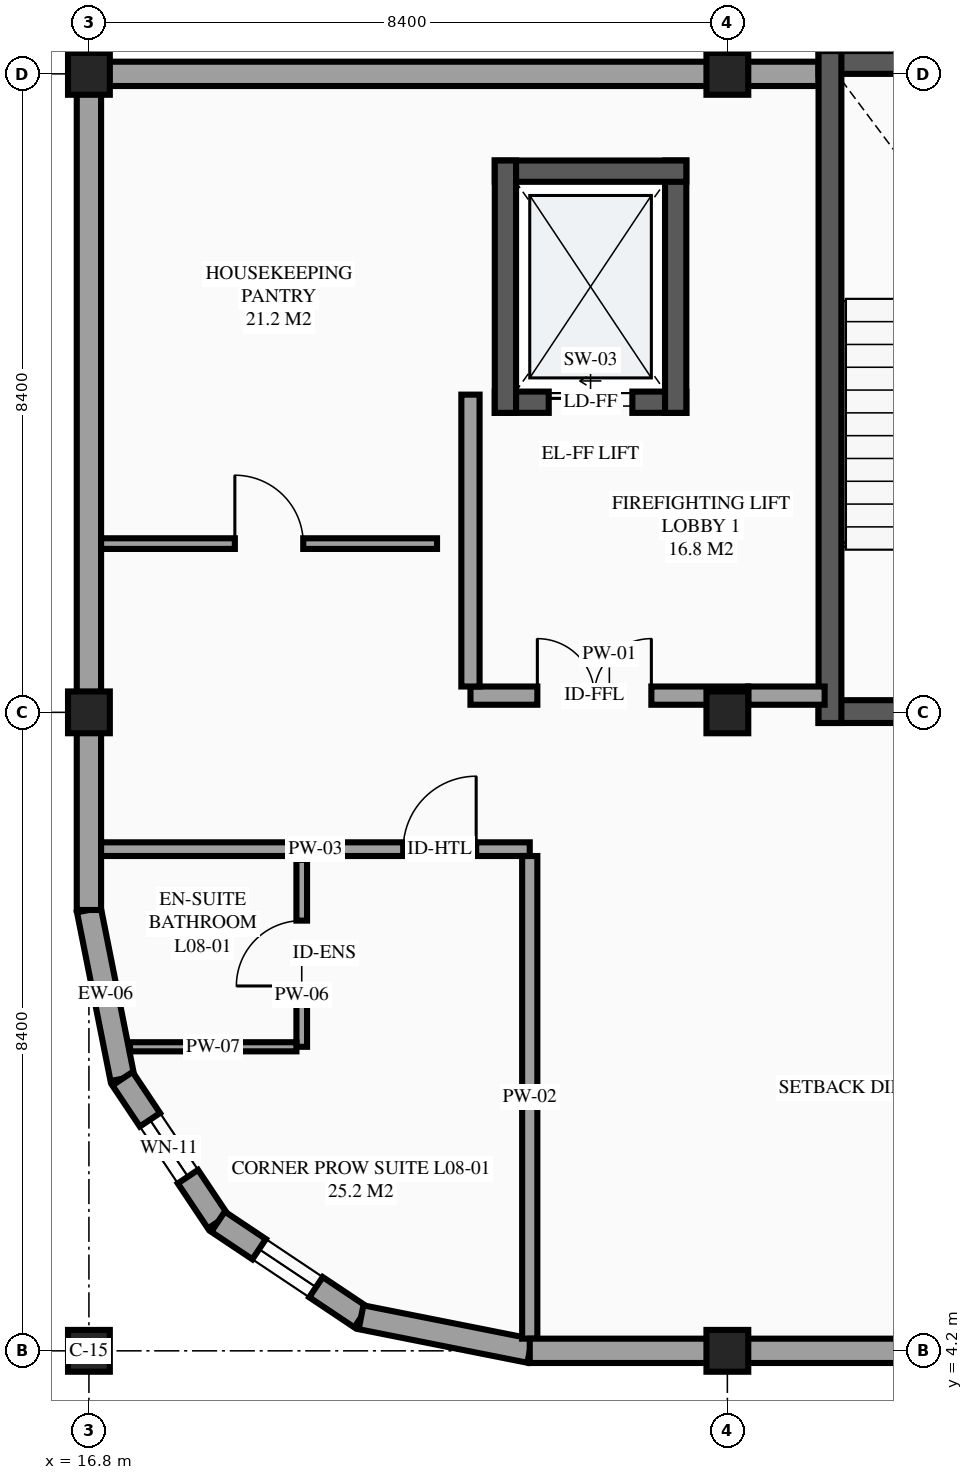
"""IFC4 building model, lengths in metres.
Left out: names, types, materials, properties, quantities, classifications, styles, units other than length and angle.
Written with IfcOpenShell. Run it as: python <this file> out.ifc"""

import sys

from ifc_helpers import new_model, si_unit, direction, frame, frame_2d, origin, origin_2d, place, context, subcontext, project, spatial, rectangle, extrude, element, fill, save


model = new_model("IFC4")
c1 = context("Model", 3, precision=1e-05, world=origin(), true_north=direction((0.0, 1.0)))
c2 = subcontext(c1, "Body", "Model", "MODEL_VIEW")
j1 = project(units=[si_unit("LENGTHUNIT", "METRE"), si_unit("PLANEANGLEUNIT", "RADIAN")], contexts=[c1])
p1 = place(None, origin())
s1 = spatial("IfcSite", under=j1, at=p1, CompositionType="ELEMENT")
p2 = place(p1, origin())
s2 = spatial("IfcBuilding", under=s1, at=p2, CompositionType="ELEMENT")
p3 = place(p2, frame((0.0, 0.0, 32.7)))
s3 = spatial("IfcBuildingStorey", under=s2, at=p3, CompositionType="ELEMENT", Elevation=32.7)
for number, where, z_axis, x_axis in (
    (1, (16.8, 4.2, 0.0), (0.0, 0.0, 1.0), (1.0, 0.0, 0.0)),
    (2, (16.8, 12.6, 0.0), (0.0, 0.0, 1.0), (1.0, 0.0, 0.0)),
    (3, (16.8, 21.0, 0.0), (0.0, 0.0, 1.0), (1.0, 0.0, 0.0)),
    (4, (25.2, 4.2, 0.0), (0.0, 0.0, 1.0), (1.0, 0.0, 0.0)),
    (5, (25.2, 12.6, 0.0), (0.0, 0.0, 1.0), (1.0, 0.0, 0.0)),
    (6, (25.2, 21.0, 0.0), (0.0, 0.0, 1.0), (1.0, 0.0, 0.0)),
):
    element("IfcColumn", number, at=place(p3, frame(where, z_axis=z_axis, x_axis=x_axis)), inside=s3, PredefinedType="COLUMN", context=c2, shape_type="SweptSolid", body=[
        extrude(rectangle(XDim=0.55, YDim=0.55, at=origin_2d()), origin(), (0.0, 0.0, 1.0), 3.6),
    ])
p4 = place(p3, frame((16.8, 10.0, 0.0), z_axis=(0.0, 0.0, 1.0), x_axis=(0.195057908159, -0.980791727363, 0.0)))
e7 = element("IfcWall", 7, at=p4, inside=s3, PredefinedType="STANDARD", context=c2, shape_type="SweptSolid", body=[
    extrude(rectangle(XDim=2.263, YDim=0.32, at=frame_2d((1.131, 0.0))), origin(), (0.0, 0.0, 1.0), 2.78),
])
p5 = place(p3, frame((17.241, 7.781, 0.0), z_axis=(0.0, 0.0, 1.0), x_axis=(0.555546297918, -0.831485604728, 0.0)))
e8 = element("IfcWall", 8, at=p5, inside=s3, PredefinedType="STANDARD", context=c2, shape_type="SweptSolid", body=[
    extrude(rectangle(XDim=2.263, YDim=0.32, at=frame_2d((1.132, 0.0))), origin(), (0.0, 0.0, 1.0), 3.6),
])
p6 = place(p5, frame((0.65, 0.0, 0.75)))
e9 = element("IfcOpeningElement", 9, at=p6, cuts=e8, PredefinedType="OPENING", context=c2, shape_type="SweptSolid", body=[
    extrude(rectangle(XDim=0.9, YDim=1.55, at=frame_2d((0.45, 0.775))), frame((0.0, 0.17, 0.0), z_axis=(0.0, -1.0, 0.0), x_axis=(1.0, 0.0, 0.0)), (0.0, 0.0, 1.0), 0.34),
])
p7 = place(p3, frame((18.499, 5.899, 0.0), z_axis=(0.0, 0.0, 1.0), x_axis=(0.831502143458, -0.555521543618, 0.0)))
e10 = element("IfcWall", 10, at=p7, inside=s3, PredefinedType="STANDARD", context=c2, shape_type="SweptSolid", body=[
    extrude(rectangle(XDim=2.263, YDim=0.32, at=frame_2d((1.131, 0.0))), origin(), (0.0, 0.0, 1.0), 3.6),
])
p8 = place(p7, frame((0.65, 0.0, 0.75)))
e11 = element("IfcOpeningElement", 11, at=p8, cuts=e10, PredefinedType="OPENING", context=c2, shape_type="SweptSolid", body=[
    extrude(rectangle(XDim=0.9, YDim=1.55, at=frame_2d((0.45, 0.775))), frame((0.0, 0.17, 0.0), z_axis=(0.0, -1.0, 0.0), x_axis=(1.0, 0.0, 0.0)), (0.0, 0.0, 1.0), 0.34),
])
p9 = place(p3, frame((20.38, 4.642, 0.0), z_axis=(0.0, 0.0, 1.0), x_axis=(0.98077519094, -0.195141038321, 0.0)))
e12 = element("IfcWall", 12, at=p9, inside=s3, PredefinedType="STANDARD", context=c2, shape_type="SweptSolid", body=[
    extrude(rectangle(XDim=2.263, YDim=0.32, at=frame_2d((1.132, 0.0))), origin(), (0.0, 0.0, 1.0), 2.88),
])
p10 = place(p3, frame((26.4, 21.0, 0.0), z_axis=(0.0, 0.0, 1.0), x_axis=(-1.0, 0.0, 0.0)))
e13 = element("IfcWall", 13, at=p10, inside=s3, PredefinedType="STANDARD", context=c2, shape_type="SweptSolid", body=[
    extrude(rectangle(XDim=9.6, YDim=0.32, at=frame_2d((4.8, 0.0))), origin(), (0.0, 0.0, 1.0), 2.53),
])
p11 = place(p3, frame((16.8, 21.0, 0.0), z_axis=(0.0, 0.0, 1.0), x_axis=(0.0, -1.0, 0.0)))
e14 = element("IfcWall", 14, at=p11, inside=s3, PredefinedType="STANDARD", context=c2, shape_type="SweptSolid", body=[
    extrude(rectangle(XDim=11.0, YDim=0.32, at=frame_2d((5.5, 0.0))), origin(), (0.0, 0.0, 1.0), 2.78),
])
p12 = place(p3, frame((22.14, 16.68, 0.0), z_axis=(0.0, 0.0, 1.0), x_axis=(1.0, 0.0, 0.0)))
e15 = element("IfcWall", 15, at=p12, inside=s3, PredefinedType="SHEAR", context=c2, shape_type="SweptSolid", body=[
    extrude(rectangle(XDim=2.52, YDim=0.28, at=frame_2d((1.26, 0.0))), origin(), (0.0, 0.0, 1.0), 3.6),
])
p13 = place(p12, frame((0.71, 0.0, 0.0)))
e16 = element("IfcOpeningElement", 16, at=p13, cuts=e15, PredefinedType="OPENING", context=c2, shape_type="SweptSolid", body=[
    extrude(rectangle(XDim=1.1, YDim=2.2, at=frame_2d((0.55, 1.1))), frame((0.0, 0.15, 0.0), z_axis=(0.0, -1.0, 0.0), x_axis=(1.0, 0.0, 0.0)), (0.0, 0.0, 1.0), 0.3),
])
p14 = place(p3, frame((24.52, 16.54, 0.0), z_axis=(0.0, 0.0, 1.0), x_axis=(0.0, 1.0, 0.0)))
e17 = element("IfcWall", 17, at=p14, inside=s3, PredefinedType="SHEAR", context=c2, shape_type="SweptSolid", body=[
    extrude(rectangle(XDim=3.32, YDim=0.28, at=frame_2d((1.66, 0.0))), origin(), (0.0, 0.0, 1.0), 3.6),
])
p15 = place(p3, frame((24.66, 19.72, 0.0), z_axis=(0.0, 0.0, 1.0), x_axis=(-1.0, 0.0, 0.0)))
e18 = element("IfcWall", 18, at=p15, inside=s3, PredefinedType="SHEAR", context=c2, shape_type="SweptSolid", body=[
    extrude(rectangle(XDim=2.52, YDim=0.28, at=frame_2d((1.26, 0.0))), origin(), (0.0, 0.0, 1.0), 3.6),
])
p16 = place(p3, frame((22.28, 19.86, 0.0), z_axis=(0.0, 0.0, 1.0), x_axis=(0.0, -1.0, 0.0)))
e19 = element("IfcWall", 19, at=p16, inside=s3, PredefinedType="SHEAR", context=c2, shape_type="SweptSolid", body=[
    extrude(rectangle(XDim=3.32, YDim=0.28, at=frame_2d((1.66, 0.0))), origin(), (0.0, 0.0, 1.0), 3.6),
])
p17 = place(p3, frame((26.4, 12.61, 0.0), z_axis=(0.0, 0.0, 1.0), x_axis=(1.0, 0.0, 0.0)))
e20 = element("IfcWall", 20, at=p17, inside=s3, PredefinedType="SHEAR", context=c2, shape_type="SweptSolid", body=[
    extrude(rectangle(XDim=5.2, YDim=0.3, at=frame_2d((2.6, 0.0))), origin(), (0.0, 0.0, 1.0), 3.6),
])
p18 = place(p17, frame((2.025, 0.0, 0.0)))
e21 = element("IfcOpeningElement", 21, at=p18, cuts=e20, PredefinedType="OPENING", context=c2, shape_type="SweptSolid", body=[
    extrude(rectangle(XDim=1.15, YDim=2.15, at=frame_2d((0.575, 1.075))), frame((0.0, 0.16, 0.0), z_axis=(0.0, -1.0, 0.0), x_axis=(1.0, 0.0, 0.0)), (0.0, 0.0, 1.0), 0.32),
])
p19 = place(p3, frame((31.6, 21.15, 0.0), z_axis=(0.0, 0.0, 1.0), x_axis=(-1.0, 0.0, 0.0)))
e22 = element("IfcWall", 22, at=p19, inside=s3, PredefinedType="SHEAR", context=c2, shape_type="SweptSolid", body=[
    extrude(rectangle(XDim=5.2, YDim=0.3, at=frame_2d((2.6, 0.0))), origin(), (0.0, 0.0, 1.0), 3.6),
])
p20 = place(p3, frame((26.55, 21.3, 0.0), z_axis=(0.0, 0.0, 1.0), x_axis=(0.0, -1.0, 0.0)))
e23 = element("IfcWall", 23, at=p20, inside=s3, PredefinedType="SHEAR", context=c2, shape_type="SweptSolid", body=[
    extrude(rectangle(XDim=8.84, YDim=0.3, at=frame_2d((4.42, 0.0))), origin(), (0.0, 0.0, 1.0), 3.6),
])
p21 = place(p3, frame((16.96, 10.8, 0.0), z_axis=(0.0, 0.0, 1.0), x_axis=(1.0, 0.0, 0.0)))
e24 = element("IfcWall", 24, at=p21, inside=s3, PredefinedType="PARTITIONING", context=c2, shape_type="SweptSolid", body=[
    extrude(rectangle(XDim=5.64, YDim=0.18, at=frame_2d((2.82, 0.0))), origin(), (0.0, 0.0, 1.0), 3.375),
])
p22 = place(p21, frame((3.975, 0.0, 0.0)))
e25 = element("IfcOpeningElement", 25, at=p22, cuts=e24, PredefinedType="OPENING", context=c2, shape_type="SweptSolid", body=[
    extrude(rectangle(XDim=0.96, YDim=2.15, at=frame_2d((0.48, 1.075))), frame((0.0, 0.1, 0.0), z_axis=(0.0, -1.0, 0.0), x_axis=(1.0, 0.0, 0.0)), (0.0, 0.0, 1.0), 0.2),
])
p23 = place(p3, frame((22.6, 4.36, 0.0), z_axis=(0.0, 0.0, 1.0), x_axis=(0.0, 1.0, 0.0)))
e26 = element("IfcWall", 26, at=p23, inside=s3, PredefinedType="PARTITIONING", context=c2, shape_type="SweptSolid", body=[
    extrude(rectangle(XDim=6.35, YDim=0.2, at=frame_2d((3.175, 0.0))), origin(), (0.0, 0.0, 1.0), 3.375),
])
p24 = place(p3, frame((19.6, 8.2, 0.0), z_axis=(0.0, 0.0, 1.0), x_axis=(0.0, 1.0, 0.0)))
e27 = element("IfcWall", 27, at=p24, inside=s3, PredefinedType="PARTITIONING", context=c2, shape_type="SweptSolid", body=[
    extrude(rectangle(XDim=2.46, YDim=0.14, at=frame_2d((1.23, 0.0))), origin(), (0.0, 0.0, 1.0), 3.375),
])
p25 = place(p24, frame((0.8, 0.0, 0.0)))
e28 = element("IfcOpeningElement", 28, at=p25, cuts=e27, PredefinedType="OPENING", context=c2, shape_type="SweptSolid", body=[
    extrude(rectangle(XDim=0.86, YDim=2.1, at=frame_2d((0.43, 1.05))), frame((0.0, 0.08, 0.0), z_axis=(0.0, -1.0, 0.0), x_axis=(1.0, 0.0, 0.0)), (0.0, 0.0, 1.0), 0.16),
])
p26 = place(p3, frame((17.34, 8.2, 0.0), z_axis=(0.0, 0.0, 1.0), x_axis=(1.0, 0.0, 0.0)))
e29 = element("IfcWall", 29, at=p26, inside=s3, PredefinedType="PARTITIONING", context=c2, shape_type="SweptSolid", body=[
    extrude(rectangle(XDim=2.19, YDim=0.12, at=frame_2d((1.095, 0.0))), origin(), (0.0, 0.0, 1.0), 3.375),
])
p27 = place(p3, frame((21.82, 12.82, 0.0), z_axis=(0.0, 0.0, 1.0), x_axis=(1.0, 0.0, 0.0)))
e30 = element("IfcWall", 30, at=p27, inside=s3, PredefinedType="PARTITIONING", context=c2, shape_type="SweptSolid", body=[
    extrude(rectangle(XDim=3.655, YDim=0.24, at=frame_2d((1.828, 0.0))), origin(), (0.0, 0.0, 1.0), 3.375),
])
p28 = place(p27, frame((0.88, 0.0, 0.0)))
e31 = element("IfcOpeningElement", 31, at=p28, cuts=e30, PredefinedType="OPENING", context=c2, shape_type="SweptSolid", body=[
    extrude(rectangle(XDim=1.5, YDim=2.15, at=frame_2d((0.75, 1.075))), frame((0.0, 0.13, 0.0), z_axis=(0.0, -1.0, 0.0), x_axis=(1.0, 0.0, 0.0)), (0.0, 0.0, 1.0), 0.26),
])
p29 = place(p3, frame((21.82, 12.94, 0.0), z_axis=(0.0, 0.0, 1.0), x_axis=(0.0, 1.0, 0.0)))
e32 = element("IfcWall", 32, at=p29, inside=s3, PredefinedType="PARTITIONING", context=c2, shape_type="SweptSolid", body=[
    extrude(rectangle(XDim=3.84, YDim=0.24, at=frame_2d((1.92, 0.0))), origin(), (0.0, 0.0, 1.0), 3.375),
])
p30 = place(p3, frame((16.96, 14.82, 0.0), z_axis=(0.0, 0.0, 1.0), x_axis=(1.0, 0.0, 0.0)))
e33 = element("IfcWall", 33, at=p30, inside=s3, PredefinedType="PARTITIONING", context=c2, shape_type="SweptSolid", body=[
    extrude(rectangle(XDim=4.42, YDim=0.14, at=frame_2d((2.21, 0.0))), origin(), (0.0, 0.0, 1.0), 3.375),
])
p31 = place(p30, frame((1.76, 0.0, 0.0)))
e34 = element("IfcOpeningElement", 34, at=p31, cuts=e33, PredefinedType="OPENING", context=c2, shape_type="SweptSolid", body=[
    extrude(rectangle(XDim=0.9, YDim=2.12, at=frame_2d((0.45, 1.06))), frame((0.0, 0.08, 0.0), z_axis=(0.0, -1.0, 0.0), x_axis=(1.0, 0.0, 0.0)), (0.0, 0.0, 1.0), 0.16),
])
p32 = place(p3, frame((22.6, 4.2, 0.0), z_axis=(0.0, 0.0, 1.0), x_axis=(1.0, 0.0, 0.0)))
e35 = element("IfcWall", 35, at=p32, inside=s3, PredefinedType="STANDARD", context=c2, shape_type="SweptSolid", body=[
    extrude(rectangle(XDim=2.6, YDim=0.32, at=frame_2d((1.3, 0.0))), origin(), (0.0, 0.0, 1.0), 2.88),
])
p33 = place(p3, frame((25.2, 4.2, 0.0), z_axis=(0.0, 0.0, 1.0), x_axis=(1.0, 0.0, 0.0)))
e36 = element("IfcWall", 36, at=p33, inside=s3, PredefinedType="STANDARD", context=c2, shape_type="SweptSolid", body=[
    extrude(rectangle(XDim=8.4, YDim=0.32, at=frame_2d((4.2, 0.0))), origin(), (0.0, 0.0, 1.0), 2.63),
])
p34 = place(p33, frame((2.25, 0.0, 0.75)))
e37 = element("IfcOpeningElement", 37, at=p34, cuts=e36, PredefinedType="OPENING", context=c2, shape_type="SweptSolid", body=[
    extrude(rectangle(XDim=2.1, YDim=1.5, at=frame_2d((1.05, 0.75))), frame((0.0, 0.17, 0.0), z_axis=(0.0, -1.0, 0.0), x_axis=(1.0, 0.0, 0.0)), (0.0, 0.0, 1.0), 0.34),
])
p35 = place(p3, frame((25.475, 12.82, 0.0), z_axis=(0.0, 0.0, 1.0), x_axis=(1.0, 0.0, 0.0)))
e38 = element("IfcWall", 38, at=p35, inside=s3, PredefinedType="PARTITIONING", context=c2, shape_type="SweptSolid", body=[
    extrude(rectangle(XDim=1.005, YDim=0.24, at=frame_2d((0.502, 0.0))), origin(), (0.0, 0.0, 1.0), 2.43),
])
p36 = place(p6, origin())
e39 = element("IfcWindow", 39, at=p36, inside=s3, PartitioningType="SINGLE_PANEL", PredefinedType="WINDOW", context=c2, shape_type="SweptSolid", body=[
    extrude(rectangle(XDim=0.9, YDim=1.55, at=frame_2d((0.45, 0.775))), frame((0.0, 0.03, 0.0), z_axis=(0.0, -1.0, 0.0), x_axis=(1.0, 0.0, 0.0)), (0.0, 0.0, 1.0), 0.06),
])
fill(e9, e39)
p37 = place(p8, origin())
e40 = element("IfcWindow", 40, at=p37, inside=s3, PartitioningType="SINGLE_PANEL", PredefinedType="WINDOW", context=c2, shape_type="SweptSolid", body=[
    extrude(rectangle(XDim=0.9, YDim=1.55, at=frame_2d((0.45, 0.775))), frame((0.0, 0.03, 0.0), z_axis=(0.0, -1.0, 0.0), x_axis=(1.0, 0.0, 0.0)), (0.0, 0.0, 1.0), 0.06),
])
fill(e11, e40)
p38 = place(p13, origin())
e41 = element("IfcDoor", 41, at=p38, inside=s3, OperationType="SLIDING_TO_LEFT", PredefinedType="DOOR", context=c2, shape_type="SweptSolid", body=[
    extrude(rectangle(XDim=1.1, YDim=2.2, at=frame_2d((0.55, 1.1))), frame((0.0, 0.025, 0.0), z_axis=(0.0, -1.0, 0.0), x_axis=(1.0, 0.0, 0.0)), (0.0, 0.0, 1.0), 0.05),
])
fill(e16, e41)
p39 = place(p22, origin())
e42 = element("IfcDoor", 42, at=p39, inside=s3, OperationType="SINGLE_SWING_RIGHT", PredefinedType="DOOR", context=c2, shape_type="SweptSolid", body=[
    extrude(rectangle(XDim=0.96, YDim=2.15, at=frame_2d((0.48, 1.075))), frame((0.0, 0.025, 0.0), z_axis=(0.0, -1.0, 0.0), x_axis=(1.0, 0.0, 0.0)), (0.0, 0.0, 1.0), 0.05),
])
fill(e25, e42)
p40 = place(p25, origin())
e43 = element("IfcDoor", 43, at=p40, inside=s3, OperationType="SINGLE_SWING_LEFT", PredefinedType="DOOR", context=c2, shape_type="SweptSolid", body=[
    extrude(rectangle(XDim=0.86, YDim=2.1, at=frame_2d((0.43, 1.05))), frame((0.0, 0.025, 0.0), z_axis=(0.0, -1.0, 0.0), x_axis=(1.0, 0.0, 0.0)), (0.0, 0.0, 1.0), 0.05),
])
fill(e28, e43)
p41 = place(p28, origin())
e44 = element("IfcDoor", 44, at=p41, inside=s3, OperationType="DOUBLE_DOOR_SINGLE_SWING", PredefinedType="DOOR", context=c2, shape_type="SweptSolid", body=[
    extrude(rectangle(XDim=1.5, YDim=2.15, at=frame_2d((0.75, 1.075))), frame((0.0, 0.025, 0.0), z_axis=(0.0, -1.0, 0.0), x_axis=(1.0, 0.0, 0.0)), (0.0, 0.0, 1.0), 0.05),
])
fill(e31, e44)
p42 = place(p31, origin())
e45 = element("IfcDoor", 45, at=p42, inside=s3, OperationType="SINGLE_SWING_LEFT", PredefinedType="DOOR", context=c2, shape_type="SweptSolid", body=[
    extrude(rectangle(XDim=0.9, YDim=2.12, at=frame_2d((0.45, 1.06))), frame((0.0, 0.025, 0.0), z_axis=(0.0, -1.0, 0.0), x_axis=(1.0, 0.0, 0.0)), (0.0, 0.0, 1.0), 0.05),
])
fill(e34, e45)
save(model, sys.argv[1])
